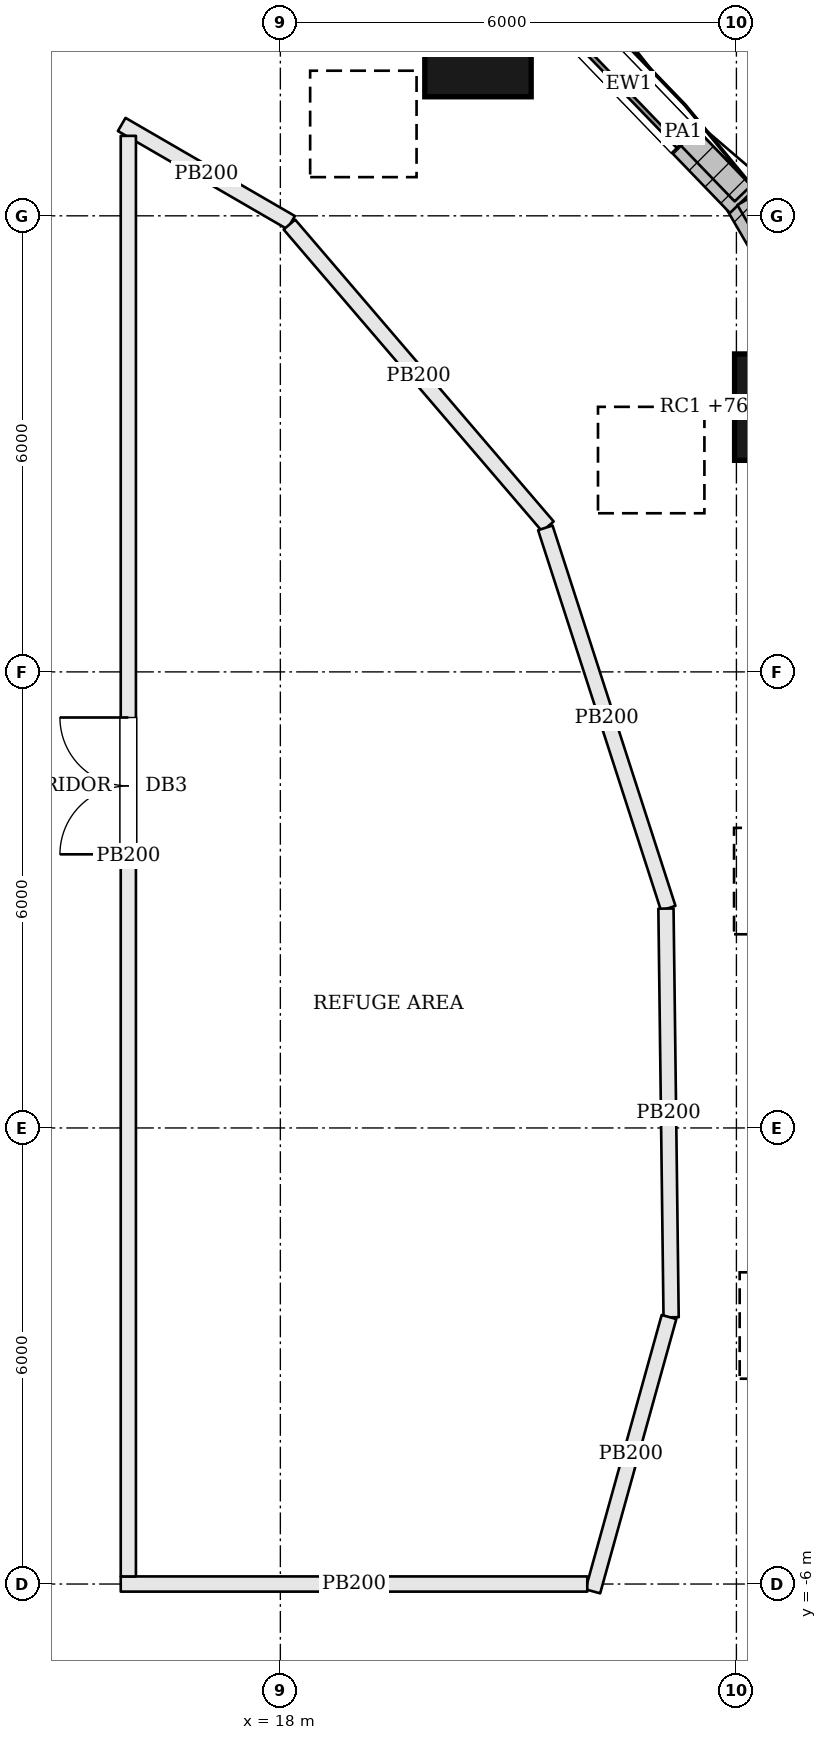
"""IFC4 building model, lengths in metres.
Left out: names, types, materials, properties, quantities, classifications, styles, units other than length and angle.
Written with IfcOpenShell. Run it as: python <this file> out.ifc"""

import sys

from ifc_helpers import new_model, si_unit, direction, frame, frame_2d, origin, origin_2d, place, context, subcontext, project, spatial, rectangle, extrude, element, fill, save


model = new_model("IFC4")
c1 = context("Model", 3, precision=1e-05, world=origin(), true_north=direction((0.0, 1.0)))
c2 = subcontext(c1, "Body", "Model", "MODEL_VIEW")
j1 = project(units=[si_unit("LENGTHUNIT", "METRE"), si_unit("PLANEANGLEUNIT", "RADIAN")], contexts=[c1])
p1 = place(None, origin())
s1 = spatial("IfcSite", under=j1, at=p1, CompositionType="ELEMENT")
p2 = place(p1, origin())
s2 = spatial("IfcBuilding", under=s1, at=p2, CompositionType="ELEMENT")
p3 = place(p2, frame((0.0, 0.0, 77.1)))
s3 = spatial("IfcBuildingStorey", under=s2, at=p3, CompositionType="ELEMENT", Elevation=77.1)
p4 = place(p3, frame((26.605, 3.503, -0.486), z_axis=(-0.437424329961, -0.05758776803, 0.897409385137), x_axis=(0.130525663052, -0.99144493104, 0.0)))
e1 = element("IfcColumn", 1, at=p4, inside=s3, PredefinedType="COLUMN", context=c2, shape_type="SweptSolid", body=[
    extrude(rectangle(XDim=1.4, YDim=1.4, at=origin_2d()), origin(), (0.0, 0.0, 1.0), 4.426),
])
p5 = place(p3, frame((24.676, 9.483, -0.49), z_axis=(-0.406404807836, -0.157350047865, 0.900042273787), x_axis=(0.361058075799, -0.932543331915, 0.0)))
e2 = element("IfcColumn", 2, at=p5, inside=s3, PredefinedType="COLUMN", context=c2, shape_type="SweptSolid", body=[
    extrude(rectangle(XDim=1.4, YDim=1.4, at=origin_2d()), origin(), (0.0, 0.0, 1.0), 4.422),
])
p6 = place(p3, frame((20.6, 14.266, -0.503), z_axis=(-0.342028722552, -0.239757870916, 0.908588199507), x_axis=(0.574004932865, -0.818851840718, 0.0)))
e3 = element("IfcColumn", 3, at=p6, inside=s3, PredefinedType="COLUMN", context=c2, shape_type="SweptSolid", body=[
    extrude(rectangle(XDim=1.4, YDim=1.4, at=origin_2d()), origin(), (0.0, 0.0, 1.0), 4.409),
])
p7 = place(p3, frame((26.684, -2.808, -0.486), z_axis=(-0.438598518342, 0.047219259427, 0.897441742537), x_axis=(-0.107040869818, -0.994254621407, 0.0)))
e4 = element("IfcColumn", 4, at=p7, inside=s3, PredefinedType="COLUMN", context=c2, shape_type="SweptSolid", body=[
    extrude(rectangle(XDim=1.4, YDim=1.4, at=origin_2d()), origin(), (0.0, 0.0, 1.0), 4.426),
])
p8 = place(p3, frame((26.23, 8.473, 0.0), z_axis=(0.0, 0.0, 1.0), x_axis=(-0.502203169453, 0.864749661227, 0.0)))
e5 = element("IfcWall", 5, at=p8, inside=s3, PredefinedType="SOLIDWALL", context=c2, shape_type="SweptSolid", body=[
    extrude(rectangle(XDim=4.353, YDim=0.45, at=frame_2d((2.176, 0.0))), origin(), (0.0, 0.0, 1.0), 4.3),
])
p9 = place(p8, frame((1.126, 0.0, 1.2)))
e6 = element("IfcOpeningElement", 6, at=p9, cuts=e5, PredefinedType="OPENING", context=c2, shape_type="SweptSolid", body=[
    extrude(rectangle(XDim=2.1, YDim=1.8, at=frame_2d((1.05, 0.9))), frame((0.0, 0.235, 0.0), z_axis=(0.0, -1.0, 0.0), x_axis=(1.0, 0.0, 0.0)), (0.0, 0.0, 1.0), 0.47),
])
p10 = place(p3, frame((24.077, 12.194, 0.0), z_axis=(0.0, 0.0, 1.0), x_axis=(-0.69406513137, 0.719912212298, 0.0)))
e7 = element("IfcWall", 7, at=p10, inside=s3, PredefinedType="SOLIDWALL", context=c2, shape_type="SweptSolid", body=[
    extrude(rectangle(XDim=4.298, YDim=0.45, at=frame_2d((2.149, 0.0))), origin(), (0.0, 0.0, 1.0), 4.3),
])
p11 = place(p10, frame((1.099, 0.0, 1.2)))
e8 = element("IfcOpeningElement", 8, at=p11, cuts=e7, PredefinedType="OPENING", context=c2, shape_type="SweptSolid", body=[
    extrude(rectangle(XDim=2.1, YDim=1.8, at=frame_2d((1.05, 0.9))), frame((0.0, 0.235, 0.0), z_axis=(0.0, -1.0, 0.0), x_axis=(1.0, 0.0, 0.0)), (0.0, 0.0, 1.0), 0.47),
])
p12 = place(p3, frame((26.262, 8.569, 4.5), z_axis=(0.0, 0.0, 1.0), x_axis=(-0.502258354831, 0.864717609976, 0.0)))
e9 = element("IfcWall", 9, at=p12, inside=s3, PredefinedType="PARAPET", context=c2, shape_type="SweptSolid", body=[
    extrude(rectangle(XDim=4.219, YDim=0.3, at=frame_2d((2.11, 0.0))), origin(), (0.0, 0.0, 1.0), 1.1),
])
p13 = place(p3, frame((24.085, 12.294, 4.5), z_axis=(0.0, 0.0, 1.0), x_axis=(-0.69408561192, 0.719892466501, 0.0)))
e10 = element("IfcWall", 10, at=p13, inside=s3, PredefinedType="PARAPET", context=c2, shape_type="SweptSolid", body=[
    extrude(rectangle(XDim=2.261, YDim=0.3, at=frame_2d((1.13, 0.0))), origin(), (0.0, 0.0, 1.0), 1.1),
])
p14 = place(p3, frame((15.913, 13.202, 0.0), z_axis=(0.0, 0.0, 1.0), x_axis=(0.86524014554, -0.501357647339, 0.0)))
e11 = element("IfcWall", 11, at=p14, inside=s3, PredefinedType="PARTITIONING", context=c2, shape_type="SweptSolid", body=[
    extrude(rectangle(XDim=2.575, YDim=0.2, at=frame_2d((1.288, 0.0))), origin(), (0.0, 0.0, 1.0), 4.3),
])
p15 = place(p3, frame((18.119, 11.885, 0.0), z_axis=(0.0, 0.0, 1.0), x_axis=(0.650510608515, -0.759497168006, 0.0)))
e12 = element("IfcWall", 12, at=p15, inside=s3, PredefinedType="PARTITIONING", context=c2, shape_type="SweptSolid", body=[
    extrude(rectangle(XDim=5.228, YDim=0.2, at=frame_2d((2.614, 0.0))), origin(), (0.0, 0.0, 1.0), 4.3),
])
p16 = place(p3, frame((21.486, 7.895, 0.0), z_axis=(0.0, 0.0, 1.0), x_axis=(0.307481575482, -0.951554034587, 0.0)))
e13 = element("IfcWall", 13, at=p16, inside=s3, PredefinedType="PARTITIONING", context=c2, shape_type="SweptSolid", body=[
    extrude(rectangle(XDim=5.259, YDim=0.2, at=frame_2d((2.629, 0.0))), origin(), (0.0, 0.0, 1.0), 4.3),
])
p17 = place(p3, frame((23.073, 2.886, 0.0), z_axis=(0.0, 0.0, 1.0), x_axis=(0.012666982201, -0.999919770563, 0.0)))
e14 = element("IfcWall", 14, at=p17, inside=s3, PredefinedType="PARTITIONING", context=c2, shape_type="SweptSolid", body=[
    extrude(rectangle(XDim=5.377, YDim=0.2, at=frame_2d((2.689, 0.0))), origin(), (0.0, 0.0, 1.0), 4.3),
])
p18 = place(p3, frame((23.113, -2.487, 0.0), z_axis=(0.0, 0.0, 1.0), x_axis=(-0.2675161078, -0.963553388281, 0.0)))
e15 = element("IfcWall", 15, at=p18, inside=s3, PredefinedType="PARTITIONING", context=c2, shape_type="SweptSolid", body=[
    extrude(rectangle(XDim=3.745, YDim=0.2, at=frame_2d((1.873, 0.0))), origin(), (0.0, 0.0, 1.0), 4.3),
])
p19 = place(p3, frame((22.038, -6.0, 0.0), z_axis=(0.0, 0.0, 1.0), x_axis=(-1.0, 0.0, 0.0)))
e16 = element("IfcWall", 16, at=p19, inside=s3, PredefinedType="PARTITIONING", context=c2, shape_type="SweptSolid", body=[
    extrude(rectangle(XDim=6.138, YDim=0.2, at=frame_2d((3.069, 0.0))), origin(), (0.0, 0.0, 1.0), 4.3),
])
p20 = place(p3, frame((16.0, -5.9, 0.0), z_axis=(0.0, 0.0, 1.0), x_axis=(0.0, 1.0, 0.0)))
e17 = element("IfcWall", 17, at=p20, inside=s3, PredefinedType="PARTITIONING", context=c2, shape_type="SweptSolid", body=[
    extrude(rectangle(XDim=18.952, YDim=0.2, at=frame_2d((9.476, 0.0))), origin(), (0.0, 0.0, 1.0), 4.3),
])
p21 = place(p20, frame((9.5, 0.0, 0.0)))
e18 = element("IfcOpeningElement", 18, at=p21, cuts=e17, PredefinedType="OPENING", context=c2, shape_type="SweptSolid", body=[
    extrude(rectangle(XDim=1.8, YDim=2.1, at=frame_2d((0.9, 1.05))), frame((0.0, 0.11, 0.0), z_axis=(0.0, -1.0, 0.0), x_axis=(1.0, 0.0, 0.0)), (0.0, 0.0, 1.0), 0.22),
])
p22 = place(p11, origin())
e19 = element("IfcWindow", 19, at=p22, inside=s3, PartitioningType="SINGLE_PANEL", PredefinedType="WINDOW", context=c2, shape_type="SweptSolid", body=[
    extrude(rectangle(XDim=2.1, YDim=1.8, at=frame_2d((1.05, 0.9))), frame((0.0, 0.135, 0.0), z_axis=(0.0, -1.0, 0.0), x_axis=(1.0, 0.0, 0.0)), (0.0, 0.0, 1.0), 0.06),
])
fill(e8, e19)
p23 = place(p21, origin())
e20 = element("IfcDoor", 20, at=p23, inside=s3, OperationType="DOUBLE_DOOR_SINGLE_SWING", PredefinedType="DOOR", context=c2, shape_type="SweptSolid", body=[
    extrude(rectangle(XDim=1.8, YDim=2.1, at=frame_2d((0.9, 1.05))), frame((0.0, 0.025, 0.0), z_axis=(0.0, -1.0, 0.0), x_axis=(1.0, 0.0, 0.0)), (0.0, 0.0, 1.0), 0.05),
])
fill(e18, e20)
save(model, sys.argv[1])
